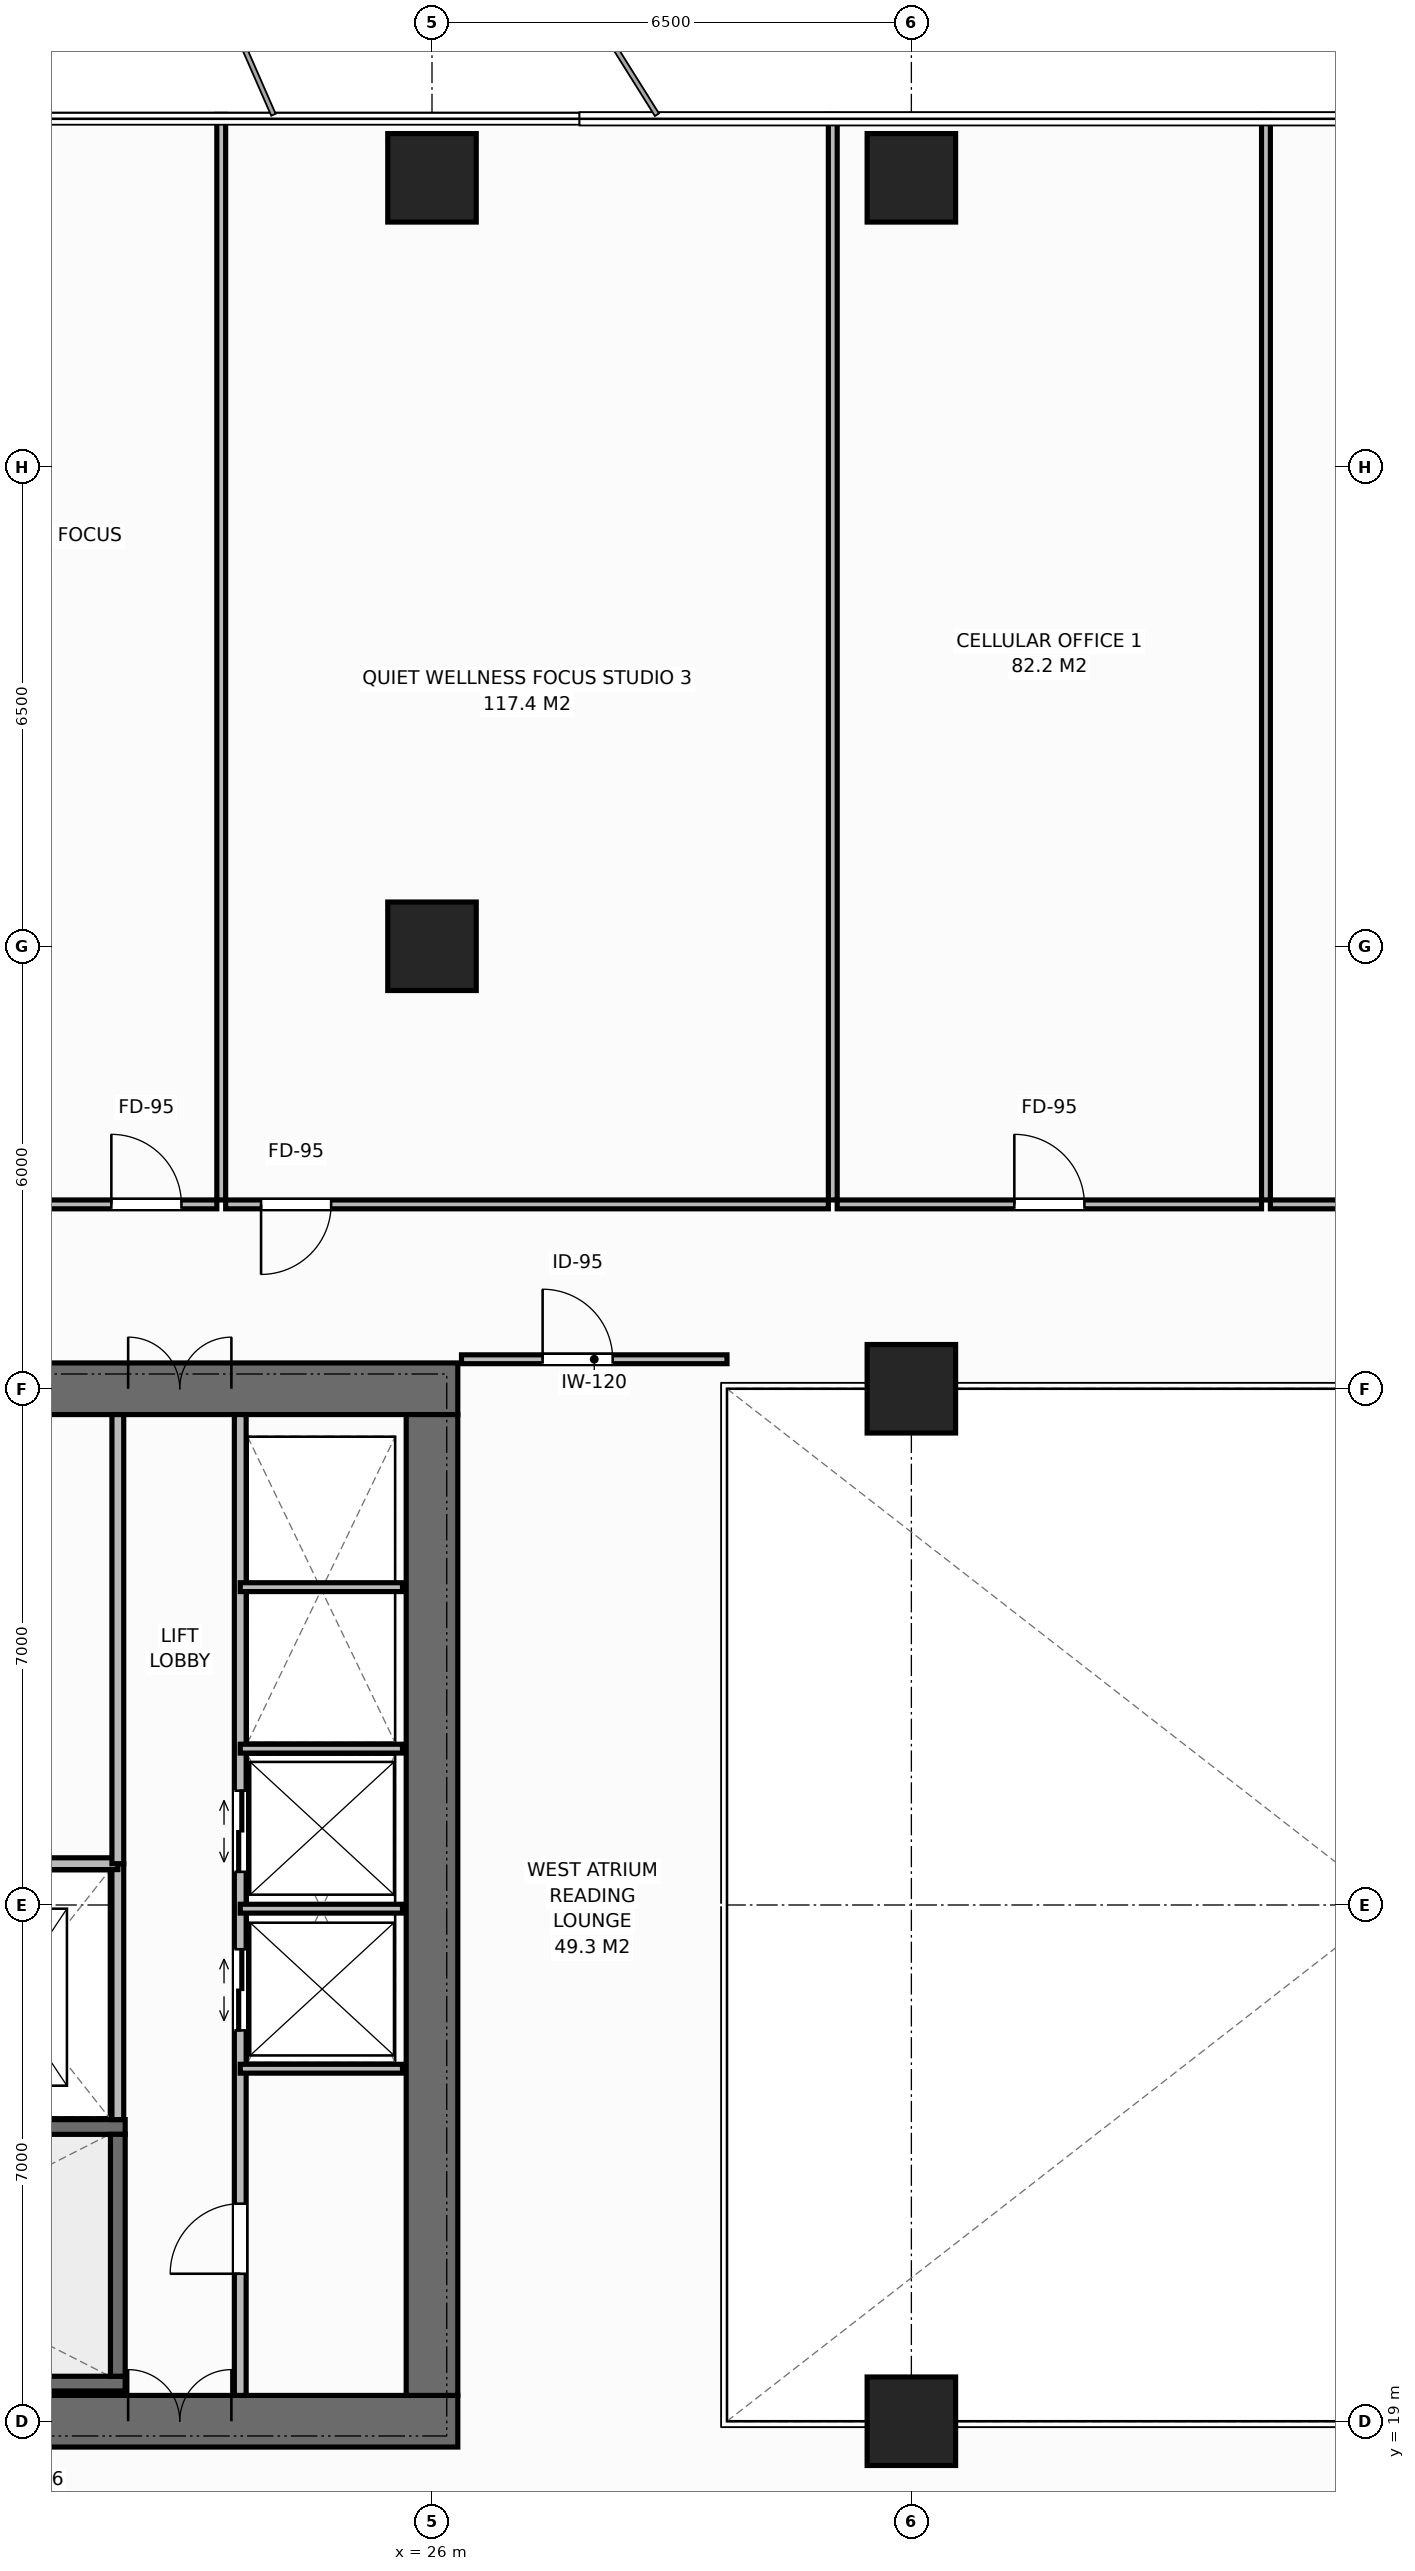
"""IFC4 building model, lengths in metres.
Left out: names, types, materials, properties, quantities, classifications, styles, units other than length and angle.
Written with IfcOpenShell. Run it as: python <this file> out.ifc"""

import sys

from ifc_helpers import new_model, si_unit, direction, frame, frame_2d, origin, origin_2d, place, context, subcontext, project, spatial, rectangle, extrude, element, fill, save


model = new_model("IFC4")
c1 = context("Model", 3, precision=1e-05, world=origin(), true_north=direction((0.0, 1.0)))
c2 = subcontext(c1, "Body", "Model", "MODEL_VIEW")
j1 = project(units=[si_unit("LENGTHUNIT", "METRE"), si_unit("PLANEANGLEUNIT", "RADIAN")], contexts=[c1])
p1 = place(None, origin())
s1 = spatial("IfcSite", under=j1, at=p1, CompositionType="ELEMENT")
p2 = place(p1, origin())
s2 = spatial("IfcBuilding", under=s1, at=p2, CompositionType="ELEMENT")
p3 = place(p2, frame((0.0, 0.0, 131.6)))
s3 = spatial("IfcBuildingStorey", under=s2, at=p3, CompositionType="ELEMENT", Elevation=131.6)
p4 = place(p3, frame((12.65, 19.0, 0.0), z_axis=(0.0, 0.0, 1.0), x_axis=(1.0, 0.0, 0.0)))
e1 = element("IfcWall", 1, at=p4, inside=s3, PredefinedType="SHEAR", context=c2, shape_type="SweptSolid", body=[
    extrude(rectangle(XDim=13.7, YDim=0.7, at=frame_2d((6.85, 0.0))), origin(), (0.0, 0.0, 1.0), 3.8),
])
p5 = place(p4, frame((9.23, 0.0, 0.0)))
e2 = element("IfcOpeningElement", 2, at=p5, cuts=e1, PredefinedType="OPENING", context=c2, shape_type="SweptSolid", body=[
    extrude(rectangle(XDim=1.4, YDim=2.2, at=frame_2d((0.7, 1.1))), frame((0.0, 0.36, 0.0), z_axis=(0.0, -1.0, 0.0), x_axis=(1.0, 0.0, 0.0)), (0.0, 0.0, 1.0), 0.72),
])
p6 = place(p3, frame((12.65, 33.0, 0.0), z_axis=(0.0, 0.0, 1.0), x_axis=(1.0, 0.0, 0.0)))
e3 = element("IfcWall", 3, at=p6, inside=s3, PredefinedType="SHEAR", context=c2, shape_type="SweptSolid", body=[
    extrude(rectangle(XDim=13.7, YDim=0.7, at=frame_2d((6.85, 0.0))), origin(), (0.0, 0.0, 1.0), 3.8),
])
p7 = place(p6, frame((1.25, 0.0, 0.0)))
e4 = element("IfcOpeningElement", 4, at=p7, cuts=e3, PredefinedType="OPENING", context=c2, shape_type="SweptSolid", body=[
    extrude(rectangle(XDim=0.9, YDim=2.15, at=frame_2d((0.45, 1.075))), frame((0.0, 0.36, 0.0), z_axis=(0.0, -1.0, 0.0), x_axis=(1.0, 0.0, 0.0)), (0.0, 0.0, 1.0), 0.72),
])
p8 = place(p6, frame((3.3, 0.0, 0.0)))
e5 = element("IfcOpeningElement", 5, at=p8, cuts=e3, PredefinedType="OPENING", context=c2, shape_type="SweptSolid", body=[
    extrude(rectangle(XDim=0.95, YDim=2.15, at=frame_2d((0.475, 1.075))), frame((0.0, 0.36, 0.0), z_axis=(0.0, -1.0, 0.0), x_axis=(1.0, 0.0, 0.0)), (0.0, 0.0, 1.0), 0.72),
])
p9 = place(p6, frame((6.15, 0.0, 0.0)))
e6 = element("IfcOpeningElement", 6, at=p9, cuts=e3, PredefinedType="OPENING", context=c2, shape_type="SweptSolid", body=[
    extrude(rectangle(XDim=0.95, YDim=2.15, at=frame_2d((0.475, 1.075))), frame((0.0, 0.36, 0.0), z_axis=(0.0, -1.0, 0.0), x_axis=(1.0, 0.0, 0.0)), (0.0, 0.0, 1.0), 0.72),
])
p10 = place(p6, frame((9.23, 0.0, 0.0)))
e7 = element("IfcOpeningElement", 7, at=p10, cuts=e3, PredefinedType="OPENING", context=c2, shape_type="SweptSolid", body=[
    extrude(rectangle(XDim=1.4, YDim=2.2, at=frame_2d((0.7, 1.1))), frame((0.0, 0.36, 0.0), z_axis=(0.0, -1.0, 0.0), x_axis=(1.0, 0.0, 0.0)), (0.0, 0.0, 1.0), 0.72),
])
p11 = place(p3, frame((26.0, 19.35, 0.0), z_axis=(0.0, 0.0, 1.0), x_axis=(0.0, 1.0, 0.0)))
e8 = element("IfcWall", 8, at=p11, inside=s3, PredefinedType="SHEAR", context=c2, shape_type="SweptSolid", body=[
    extrude(rectangle(XDim=13.3, YDim=0.7, at=frame_2d((6.65, 0.0))), origin(), (0.0, 0.0, 1.0), 3.8),
])
p12 = place(p3, frame((13.41, 19.51, 0.0), z_axis=(0.0, 0.0, 1.0), x_axis=(1.0, 0.0, 0.0)))
e9 = element("IfcWall", 9, at=p12, inside=s3, PredefinedType="SHEAR", context=c2, shape_type="SweptSolid", body=[
    extrude(rectangle(XDim=8.43, YDim=0.2, at=frame_2d((4.215, 0.0))), origin(), (0.0, 0.0, 1.0), 3.8),
])
p13 = place(p3, frame((13.41, 22.99, 0.0), z_axis=(0.0, 0.0, 1.0), x_axis=(1.0, 0.0, 0.0)))
e10 = element("IfcWall", 10, at=p13, inside=s3, PredefinedType="SHEAR", context=c2, shape_type="SweptSolid", body=[
    extrude(rectangle(XDim=8.43, YDim=0.2, at=frame_2d((4.215, 0.0))), origin(), (0.0, 0.0, 1.0), 3.8),
])
p14 = place(p13, frame((0.45, 0.0, 0.0)))
e11 = element("IfcOpeningElement", 11, at=p14, cuts=e10, PredefinedType="OPENING", context=c2, shape_type="SweptSolid", body=[
    extrude(rectangle(XDim=1.0, YDim=2.15, at=frame_2d((0.5, 1.075))), frame((0.0, 0.11, 0.0), z_axis=(0.0, -1.0, 0.0), x_axis=(1.0, 0.0, 0.0)), (0.0, 0.0, 1.0), 0.22),
])
p15 = place(p3, frame((21.74, 19.61, 0.0), z_axis=(0.0, 0.0, 1.0), x_axis=(0.0, 1.0, 0.0)))
e12 = element("IfcWall", 12, at=p15, inside=s3, PredefinedType="SHEAR", context=c2, shape_type="SweptSolid", body=[
    extrude(rectangle(XDim=3.28, YDim=0.2, at=frame_2d((1.64, 0.0))), origin(), (0.0, 0.0, 1.0), 3.8),
])
for number, where, z_axis, x_axis in (
    (13, (32.5, 19.0, 0.0), (0.0, 0.0, 1.0), (1.0, 0.0, 0.0)),
    (14, (32.5, 33.0, 0.0), (0.0, 0.0, 1.0), (1.0, 0.0, 0.0)),
    (15, (26.0, 39.0, 0.0), (0.0, 0.0, 1.0), (1.0, 0.0, 0.0)),
    (16, (26.0, 49.42, 0.0), (0.0, 0.0, 1.0), (1.0, 0.0, 0.0)),
    (17, (32.5, 49.42, 0.0), (0.0, 0.0, 1.0), (1.0, 0.0, 0.0)),
):
    element("IfcColumn", number, at=place(p3, frame(where, z_axis=z_axis, x_axis=x_axis)), inside=s3, PredefinedType="COLUMN", context=c2, shape_type="SweptSolid", body=[
        extrude(rectangle(XDim=1.2, YDim=1.2, at=origin_2d()), origin(), (0.0, 0.0, 1.0), 3.8),
    ])
p16 = place(p3, frame((21.74, 23.09, 0.0), z_axis=(0.0, 0.0, 1.0), x_axis=(0.0, 1.0, 0.0)))
e18 = element("IfcWall", 18, at=p16, inside=s3, PredefinedType="STANDARD", context=c2, shape_type="SweptSolid", body=[
    extrude(rectangle(XDim=3.47, YDim=0.16, at=frame_2d((1.735, 0.0))), origin(), (0.0, 0.0, 1.0), 3.565),
])
p17 = place(p3, frame((13.4, 26.56, 0.0), z_axis=(0.0, 0.0, 1.0), x_axis=(1.0, 0.0, 0.0)))
e19 = element("IfcWall", 19, at=p17, inside=s3, PredefinedType="STANDARD", context=c2, shape_type="SweptSolid", body=[
    extrude(rectangle(XDim=8.34, YDim=0.16, at=frame_2d((4.17, 0.0))), origin(), (0.0, 0.0, 1.0), 3.565),
])
p18 = place(p3, frame((21.74, 26.56, 0.0), z_axis=(0.0, 0.0, 1.0), x_axis=(0.0, 1.0, 0.0)))
e20 = element("IfcWall", 20, at=p18, inside=s3, PredefinedType="STANDARD", context=c2, shape_type="SweptSolid", body=[
    extrude(rectangle(XDim=6.09, YDim=0.16, at=frame_2d((3.045, 0.0))), origin(), (0.0, 0.0, 1.0), 3.565),
])
p19 = place(p3, frame((23.4, 19.35, 0.0), z_axis=(0.0, 0.0, 1.0), x_axis=(0.0, 1.0, 0.0)))
e21 = element("IfcWall", 21, at=p19, inside=s3, PredefinedType="STANDARD", context=c2, shape_type="SweptSolid", body=[
    extrude(rectangle(XDim=13.3, YDim=0.16, at=frame_2d((6.65, 0.0))), origin(), (0.0, 0.0, 1.0), 3.565),
])
p20 = place(p19, frame((1.65, 0.0, 0.0)))
e22 = element("IfcOpeningElement", 22, at=p20, cuts=e21, PredefinedType="OPENING", context=c2, shape_type="SweptSolid", body=[
    extrude(rectangle(XDim=0.95, YDim=2.15, at=frame_2d((0.475, 1.075))), frame((0.0, 0.09, 0.0), z_axis=(0.0, -1.0, 0.0), x_axis=(1.0, 0.0, 0.0)), (0.0, 0.0, 1.0), 0.18),
])
p21 = place(p19, frame((4.95, 0.0, 0.0)))
e23 = element("IfcOpeningElement", 23, at=p21, cuts=e21, PredefinedType="OPENING", context=c2, shape_type="SweptSolid", body=[
    extrude(rectangle(XDim=1.1, YDim=2.2, at=frame_2d((0.55, 1.1))), frame((0.0, 0.09, 0.0), z_axis=(0.0, -1.0, 0.0), x_axis=(1.0, 0.0, 0.0)), (0.0, 0.0, 1.0), 0.18),
])
p22 = place(p19, frame((7.1, 0.0, 0.0)))
e24 = element("IfcOpeningElement", 24, at=p22, cuts=e21, PredefinedType="OPENING", context=c2, shape_type="SweptSolid", body=[
    extrude(rectangle(XDim=1.1, YDim=2.2, at=frame_2d((0.55, 1.1))), frame((0.0, 0.09, 0.0), z_axis=(0.0, -1.0, 0.0), x_axis=(1.0, 0.0, 0.0)), (0.0, 0.0, 1.0), 0.18),
])
for number, where, z_axis, x_axis in (
    (25, (23.4, 23.78, 0.0), (0.0, 0.0, 1.0), (1.0, 0.0, 0.0)),
    (26, (23.4, 25.95, 0.0), (0.0, 0.0, 1.0), (1.0, 0.0, 0.0)),
    (27, (23.4, 28.12, 0.0), (0.0, 0.0, 1.0), (1.0, 0.0, 0.0)),
    (28, (23.4, 30.31, 0.0), (0.0, 0.0, 1.0), (1.0, 0.0, 0.0)),
):
    element("IfcWall", number, at=place(p3, frame(where, z_axis=z_axis, x_axis=x_axis)), inside=s3, PredefinedType="PARTITIONING", context=c2, shape_type="SweptSolid", body=[
        extrude(rectangle(XDim=2.2, YDim=0.12, at=frame_2d((1.1, 0.0))), origin(), (0.0, 0.0, 1.0), 3.565),
    ])
p23 = place(p3, frame((26.4, 33.4, 0.0), z_axis=(0.0, 0.0, 1.0), x_axis=(1.0, 0.0, 0.0)))
e29 = element("IfcWall", 29, at=p23, inside=s3, PredefinedType="PARTITIONING", context=c2, shape_type="SweptSolid", body=[
    extrude(rectangle(XDim=3.6, YDim=0.12, at=frame_2d((1.8, 0.0))), origin(), (0.0, 0.0, 1.0), 3.565),
])
p24 = place(p23, frame((1.1, 0.0, 0.0)))
e30 = element("IfcOpeningElement", 30, at=p24, cuts=e29, PredefinedType="OPENING", context=c2, shape_type="SweptSolid", body=[
    extrude(rectangle(XDim=0.95, YDim=2.15, at=frame_2d((0.475, 1.075))), frame((0.0, 0.07, 0.0), z_axis=(0.0, -1.0, 0.0), x_axis=(1.0, 0.0, 0.0)), (0.0, 0.0, 1.0), 0.14),
])
p25 = place(p3, frame((23.142, 35.56, 0.0), z_axis=(0.0, 0.0, 1.0), x_axis=(0.0, 1.0, 0.0)))
e31 = element("IfcWall", 31, at=p25, inside=s3, PredefinedType="PARTITIONING", context=c2, shape_type="SweptSolid", body=[
    extrude(rectangle(XDim=14.72, YDim=0.12, at=frame_2d((7.36, 0.0))), origin(), (0.0, 0.0, 1.0), 3.565),
])
p26 = place(p3, frame((17.329, 35.5, 0.0), z_axis=(0.0, 0.0, 1.0), x_axis=(1.0, 0.0, 0.0)))
e32 = element("IfcWall", 32, at=p26, inside=s3, PredefinedType="PARTITIONING", context=c2, shape_type="SweptSolid", body=[
    extrude(rectangle(XDim=5.754, YDim=0.12, at=frame_2d((2.877, 0.0))), origin(), (0.0, 0.0, 1.0), 3.565),
])
p27 = place(p26, frame((4.323, 0.0, 0.0)))
e33 = element("IfcOpeningElement", 33, at=p27, cuts=e32, PredefinedType="OPENING", context=c2, shape_type="SweptSolid", body=[
    extrude(rectangle(XDim=0.95, YDim=2.15, at=frame_2d((0.475, 1.075))), frame((0.0, 0.07, 0.0), z_axis=(0.0, -1.0, 0.0), x_axis=(1.0, 0.0, 0.0)), (0.0, 0.0, 1.0), 0.14),
])
p28 = place(p3, frame((31.434, 35.56, 0.0), z_axis=(0.0, 0.0, 1.0), x_axis=(0.0, 1.0, 0.0)))
e34 = element("IfcWall", 34, at=p28, inside=s3, PredefinedType="PARTITIONING", context=c2, shape_type="SweptSolid", body=[
    extrude(rectangle(XDim=14.72, YDim=0.12, at=frame_2d((7.36, 0.0))), origin(), (0.0, 0.0, 1.0), 3.565),
])
p29 = place(p3, frame((23.202, 35.5, 0.0), z_axis=(0.0, 0.0, 1.0), x_axis=(1.0, 0.0, 0.0)))
e35 = element("IfcWall", 35, at=p29, inside=s3, PredefinedType="PARTITIONING", context=c2, shape_type="SweptSolid", body=[
    extrude(rectangle(XDim=8.172, YDim=0.12, at=frame_2d((4.086, 0.0))), origin(), (0.0, 0.0, 1.0), 3.565),
])
p30 = place(p29, frame((0.48, 0.0, 0.0)))
e36 = element("IfcOpeningElement", 36, at=p30, cuts=e35, PredefinedType="OPENING", context=c2, shape_type="SweptSolid", body=[
    extrude(rectangle(XDim=0.95, YDim=2.15, at=frame_2d((0.475, 1.075))), frame((0.0, 0.07, 0.0), z_axis=(0.0, -1.0, 0.0), x_axis=(1.0, 0.0, 0.0)), (0.0, 0.0, 1.0), 0.14),
])
p31 = place(p3, frame((37.308, 35.56, 0.0), z_axis=(0.0, 0.0, 1.0), x_axis=(0.0, 1.0, 0.0)))
e37 = element("IfcWall", 37, at=p31, inside=s3, PredefinedType="PARTITIONING", context=c2, shape_type="SweptSolid", body=[
    extrude(rectangle(XDim=14.72, YDim=0.12, at=frame_2d((7.36, 0.0))), origin(), (0.0, 0.0, 1.0), 3.565),
])
p32 = place(p3, frame((31.494, 35.5, 0.0), z_axis=(0.0, 0.0, 1.0), x_axis=(1.0, 0.0, 0.0)))
e38 = element("IfcWall", 38, at=p32, inside=s3, PredefinedType="PARTITIONING", context=c2, shape_type="SweptSolid", body=[
    extrude(rectangle(XDim=5.753, YDim=0.12, at=frame_2d((2.877, 0.0))), origin(), (0.0, 0.0, 1.0), 3.565),
])
p33 = place(p32, frame((2.402, 0.0, 0.0)))
e39 = element("IfcOpeningElement", 39, at=p33, cuts=e38, PredefinedType="OPENING", context=c2, shape_type="SweptSolid", body=[
    extrude(rectangle(XDim=0.95, YDim=2.15, at=frame_2d((0.475, 1.075))), frame((0.0, 0.07, 0.0), z_axis=(0.0, -1.0, 0.0), x_axis=(1.0, 0.0, 0.0)), (0.0, 0.0, 1.0), 0.14),
])
p34 = place(p3, frame((37.368, 35.5, 0.0), z_axis=(0.0, 0.0, 1.0), x_axis=(1.0, 0.0, 0.0)))
e40 = element("IfcWall", 40, at=p34, inside=s3, PredefinedType="PARTITIONING", context=c2, shape_type="SweptSolid", body=[
    extrude(rectangle(XDim=8.172, YDim=0.12, at=frame_2d((4.086, 0.0))), origin(), (0.0, 0.0, 1.0), 3.565),
])
p35 = place(p34, frame((3.611, 0.0, 0.0)))
e41 = element("IfcOpeningElement", 41, at=p35, cuts=e40, PredefinedType="OPENING", context=c2, shape_type="SweptSolid", body=[
    extrude(rectangle(XDim=0.95, YDim=2.15, at=frame_2d((0.475, 1.075))), frame((0.0, 0.07, 0.0), z_axis=(0.0, -1.0, 0.0), x_axis=(1.0, 0.0, 0.0)), (0.0, 0.0, 1.0), 0.14),
])
p36 = place(p5, origin())
e42 = element("IfcDoor", 42, at=p36, inside=s3, OperationType="DOUBLE_DOOR_SINGLE_SWING", PredefinedType="DOOR", context=c2, shape_type="SweptSolid", body=[
    extrude(rectangle(XDim=1.4, YDim=2.2, at=frame_2d((0.7, 1.1))), frame((0.0, 0.125, 0.0), z_axis=(0.0, -1.0, 0.0), x_axis=(1.0, 0.0, 0.0)), (0.0, 0.0, 1.0), 0.05),
])
fill(e2, e42)
p37 = place(p10, origin())
e43 = element("IfcDoor", 43, at=p37, inside=s3, OperationType="DOUBLE_DOOR_SINGLE_SWING", PredefinedType="DOOR", context=c2, shape_type="SweptSolid", body=[
    extrude(rectangle(XDim=1.4, YDim=2.2, at=frame_2d((0.7, 1.1))), frame((0.0, -0.075, 0.0), z_axis=(0.0, -1.0, 0.0), x_axis=(1.0, 0.0, 0.0)), (0.0, 0.0, 1.0), 0.05),
])
fill(e7, e43)
p38 = place(p20, origin())
e44 = element("IfcDoor", 44, at=p38, inside=s3, OperationType="SINGLE_SWING_LEFT", PredefinedType="DOOR", context=c2, shape_type="SweptSolid", body=[
    extrude(rectangle(XDim=0.95, YDim=2.15, at=frame_2d((0.475, 1.075))), frame((0.0, 0.025, 0.0), z_axis=(0.0, -1.0, 0.0), x_axis=(1.0, 0.0, 0.0)), (0.0, 0.0, 1.0), 0.05),
])
fill(e22, e44)
p39 = place(p21, origin())
e45 = element("IfcDoor", 45, at=p39, inside=s3, OperationType="DOUBLE_DOOR_SLIDING", PredefinedType="DOOR", context=c2, shape_type="SweptSolid", body=[
    extrude(rectangle(XDim=1.1, YDim=2.2, at=frame_2d((0.55, 1.1))), frame((0.0, 0.025, 0.0), z_axis=(0.0, -1.0, 0.0), x_axis=(1.0, 0.0, 0.0)), (0.0, 0.0, 1.0), 0.05),
])
fill(e23, e45)
p40 = place(p22, origin())
e46 = element("IfcDoor", 46, at=p40, inside=s3, OperationType="DOUBLE_DOOR_SLIDING", PredefinedType="DOOR", context=c2, shape_type="SweptSolid", body=[
    extrude(rectangle(XDim=1.1, YDim=2.2, at=frame_2d((0.55, 1.1))), frame((0.0, 0.025, 0.0), z_axis=(0.0, -1.0, 0.0), x_axis=(1.0, 0.0, 0.0)), (0.0, 0.0, 1.0), 0.05),
])
fill(e24, e46)
p41 = place(p24, origin())
e47 = element("IfcDoor", 47, at=p41, inside=s3, OperationType="SINGLE_SWING_LEFT", PredefinedType="DOOR", context=c2, shape_type="SweptSolid", body=[
    extrude(rectangle(XDim=0.95, YDim=2.15, at=frame_2d((0.475, 1.075))), frame((0.0, 0.025, 0.0), z_axis=(0.0, -1.0, 0.0), x_axis=(1.0, 0.0, 0.0)), (0.0, 0.0, 1.0), 0.05),
])
fill(e30, e47)
p42 = place(p27, origin())
e48 = element("IfcDoor", 48, at=p42, inside=s3, OperationType="SINGLE_SWING_LEFT", PredefinedType="DOOR", context=c2, shape_type="SweptSolid", body=[
    extrude(rectangle(XDim=0.95, YDim=2.15, at=frame_2d((0.475, 1.075))), frame((0.0, 0.025, 0.0), z_axis=(0.0, -1.0, 0.0), x_axis=(1.0, 0.0, 0.0)), (0.0, 0.0, 1.0), 0.05),
])
fill(e33, e48)
p43 = place(p30, origin())
e49 = element("IfcDoor", 49, at=p43, inside=s3, OperationType="SINGLE_SWING_RIGHT", PredefinedType="DOOR", context=c2, shape_type="SweptSolid", body=[
    extrude(rectangle(XDim=0.95, YDim=2.15, at=frame_2d((0.475, 1.075))), frame((0.0, 0.025, 0.0), z_axis=(0.0, -1.0, 0.0), x_axis=(1.0, 0.0, 0.0)), (0.0, 0.0, 1.0), 0.05),
])
fill(e36, e49)
p44 = place(p33, origin())
e50 = element("IfcDoor", 50, at=p44, inside=s3, OperationType="SINGLE_SWING_LEFT", PredefinedType="DOOR", context=c2, shape_type="SweptSolid", body=[
    extrude(rectangle(XDim=0.95, YDim=2.15, at=frame_2d((0.475, 1.075))), frame((0.0, 0.025, 0.0), z_axis=(0.0, -1.0, 0.0), x_axis=(1.0, 0.0, 0.0)), (0.0, 0.0, 1.0), 0.05),
])
fill(e39, e50)
save(model, sys.argv[1])
